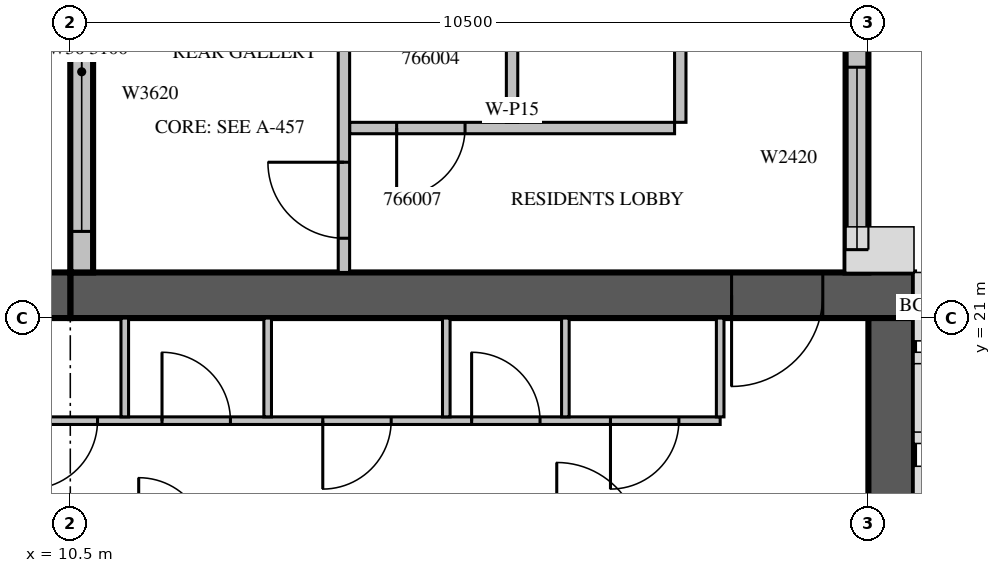
"""IFC4 building model, lengths in metres.
Left out: names, types, materials, properties, quantities, classifications, styles, units other than length and angle.
Written with IfcOpenShell. Run it as: python <this file> out.ifc"""

import sys

from ifc_helpers import new_model, si_unit, direction, frame, frame_2d, origin, place, context, subcontext, project, spatial, rectangle, extrude, source, transform, mapped, element, fill, save


model = new_model("IFC4")
c1 = context("Model", 3, precision=1e-05, world=origin(), true_north=direction((0.0, 1.0)))
c2 = subcontext(c1, "Body", "Model", "MODEL_VIEW")
j1 = project(units=[si_unit("LENGTHUNIT", "METRE"), si_unit("PLANEANGLEUNIT", "RADIAN")], contexts=[c1])
p1 = place(None, origin())
s1 = spatial("IfcSite", under=j1, at=p1, CompositionType="ELEMENT")
p2 = place(p1, origin())
s2 = spatial("IfcBuilding", under=s1, at=p2, CompositionType="ELEMENT")
p3 = place(p2, frame((0.0, 0.0, 291.5)))
s3 = spatial("IfcBuildingStorey", under=s2, at=p3, CompositionType="ELEMENT", Elevation=291.5)
m1 = source(origin(), c2, "Body", "SweptSolid", [
    extrude(rectangle(XDim=11.1, YDim=0.6, at=frame_2d((5.55, 0.0))), origin(), (0.0, 0.0, 1.0), 3.5),
])
p4 = place(p3, frame((10.5, 21.3, 0.0), z_axis=(0.0, 0.0, 1.0), x_axis=(1.0, 0.0, 0.0)))
e1 = element("IfcWall", 1, at=p4, inside=s3, PredefinedType="SHEAR", context=c2, shape_type="MappedRepresentation", body=[
    mapped(m1, transform((0.0, 0.0, 0.0), scale=1.0)),
])
m2 = source(origin(), c2, "Body", "SweptSolid", [
    extrude(rectangle(XDim=1.2, YDim=2.1, at=frame_2d((0.6, 1.05))), frame((0.0, 0.31, 0.0), z_axis=(0.0, -1.0, 0.0), x_axis=(1.0, 0.0, 0.0)), (0.0, 0.0, 1.0), 0.62),
])
p5 = place(p4, frame((8.7, 0.0, 0.0)))
e2 = element("IfcOpeningElement", 2, at=p5, cuts=e1, PredefinedType="OPENING", context=c2, shape_type="MappedRepresentation", body=[
    mapped(m2, transform((0.0, 0.0, 0.0), scale=1.0)),
])
m3 = source(origin(), c2, "Body", "SweptSolid", [
    extrude(rectangle(XDim=10.5, YDim=0.6, at=frame_2d((5.25, 0.0))), origin(), (0.0, 0.0, 1.0), 3.5),
])
p6 = place(p3, frame((21.3, 10.5, 0.0), z_axis=(0.0, 0.0, 1.0), x_axis=(0.0, 1.0, 0.0)))
e3 = element("IfcWall", 3, at=p6, inside=s3, PredefinedType="SHEAR", context=c2, shape_type="MappedRepresentation", body=[
    mapped(m3, transform((0.0, 0.0, 0.0), scale=1.0)),
])
m4 = source(origin(), c2, "Body", "SweptSolid", [
    extrude(rectangle(XDim=1.2, YDim=2.4, at=frame_2d((0.6, 1.2))), frame((0.0, 0.31, 0.0), z_axis=(0.0, -1.0, 0.0), x_axis=(1.0, 0.0, 0.0)), (0.0, 0.0, 1.0), 0.62),
])
p7 = place(p6, frame((5.7, 0.0, 0.6)))
e4 = element("IfcOpeningElement", 4, at=p7, cuts=e3, PredefinedType="OPENING", context=c2, shape_type="MappedRepresentation", body=[
    mapped(m4, transform((0.0, 0.0, 0.0), scale=1.0)),
])
m5 = source(origin(), c2, "Body", "SweptSolid", [
    extrude(rectangle(XDim=6.6, YDim=0.6, at=frame_2d((3.3, 0.0))), origin(), (0.0, 0.0, 1.0), 3.5),
])
p8 = place(p3, frame((3.9, 21.3, 0.0), z_axis=(0.0, 0.0, 1.0), x_axis=(1.0, 0.0, 0.0)))
e5 = element("IfcWall", 5, at=p8, inside=s3, PredefinedType="SHEAR", context=c2, shape_type="MappedRepresentation", body=[
    mapped(m5, transform((0.0, 0.0, 0.0), scale=1.0)),
])
p9 = place(p8, frame((1.5, 0.0, 0.6)))
e6 = element("IfcOpeningElement", 6, at=p9, cuts=e5, PredefinedType="OPENING", context=c2, shape_type="MappedRepresentation", body=[
    mapped(m4, transform((0.0, 0.0, 0.0), scale=1.0)),
])
p10 = place(p8, frame((3.6, 0.0, 0.6)))
e7 = element("IfcOpeningElement", 7, at=p10, cuts=e5, PredefinedType="OPENING", context=c2, shape_type="MappedRepresentation", body=[
    mapped(m4, transform((0.0, 0.0, 0.0), scale=1.0)),
])
m6 = source(origin(), c2, "Body", "SweptSolid", [
    extrude(rectangle(XDim=7.45, YDim=0.3, at=frame_2d((3.725, 0.0))), origin(), (0.0, 0.0, 1.0), 3.1),
])
p11 = place(p3, frame((20.85, 21.6, 0.0), z_axis=(0.0, 0.0, 1.0), x_axis=(0.0, 1.0, 0.0)))
e8 = element("IfcWall", 8, at=p11, inside=s3, PredefinedType="STANDARD", context=c2, shape_type="MappedRepresentation", body=[
    mapped(m6, transform((0.0, 0.0, 0.0), scale=1.0)),
])
m7 = source(origin(), c2, "Body", "SweptSolid", [
    extrude(rectangle(XDim=2.4, YDim=2.0, at=frame_2d((1.2, 1.0))), frame((0.0, 0.16, 0.0), z_axis=(0.0, -1.0, 0.0), x_axis=(1.0, 0.0, 0.0)), (0.0, 0.0, 1.0), 0.32),
])
p12 = place(p11, frame((0.3, 0.0, 0.6)))
e9 = element("IfcOpeningElement", 9, at=p12, cuts=e8, PredefinedType="OPENING", context=c2, shape_type="MappedRepresentation", body=[
    mapped(m7, transform((0.0, 0.0, 0.0), scale=1.0)),
])
m8 = source(origin(), c2, "Body", "SweptSolid", [
    extrude(rectangle(XDim=3.0, YDim=2.0, at=frame_2d((1.5, 1.0))), frame((0.0, 0.16, 0.0), z_axis=(0.0, -1.0, 0.0), x_axis=(1.0, 0.0, 0.0)), (0.0, 0.0, 1.0), 0.32),
])
p13 = place(p11, frame((4.2, 0.0, 0.6)))
e10 = element("IfcOpeningElement", 10, at=p13, cuts=e8, PredefinedType="OPENING", context=c2, shape_type="MappedRepresentation", body=[
    mapped(m8, transform((0.0, 0.0, 0.0), scale=1.0)),
])
m9 = source(origin(), c2, "Body", "SweptSolid", [
    extrude(rectangle(XDim=5.28, YDim=0.3, at=frame_2d((2.64, 0.0))), origin(), (0.0, 0.0, 1.0), 3.1),
])
p14 = place(p3, frame((10.65, 26.88, 0.0), z_axis=(0.0, 0.0, 1.0), x_axis=(0.0, -1.0, 0.0)))
e11 = element("IfcWall", 11, at=p14, inside=s3, PredefinedType="STANDARD", context=c2, shape_type="MappedRepresentation", body=[
    mapped(m9, transform((0.0, 0.0, 0.0), scale=1.0)),
])
m10 = source(origin(), c2, "Body", "SweptSolid", [
    extrude(rectangle(XDim=3.6, YDim=2.0, at=frame_2d((1.8, 1.0))), frame((0.0, 0.16, 0.0), z_axis=(0.0, -1.0, 0.0), x_axis=(1.0, 0.0, 0.0)), (0.0, 0.0, 1.0), 0.32),
])
p15 = place(p14, frame((1.14, 0.0, 0.6)))
e12 = element("IfcOpeningElement", 12, at=p15, cuts=e11, PredefinedType="OPENING", context=c2, shape_type="MappedRepresentation", body=[
    mapped(m10, transform((0.0, 0.0, 0.0), scale=1.0)),
])
p16 = place(p3, frame((9.65, 19.65, 0.0), z_axis=(0.0, 0.0, 1.0), x_axis=(1.0, 0.0, 0.0)))
e13 = element("IfcWall", 13, at=p16, inside=s3, PredefinedType="PARTITIONING", context=c2, shape_type="SweptSolid", body=[
    extrude(rectangle(XDim=9.4, YDim=0.1, at=frame_2d((4.7, 0.0))), origin(), (0.0, 0.0, 1.0), 3.1),
])
p17 = place(p16, frame((0.308, 0.0, 0.0)))
e14 = element("IfcOpeningElement", 14, at=p17, cuts=e13, PredefinedType="OPENING", context=c2, shape_type="SweptSolid", body=[
    extrude(rectangle(XDim=0.9, YDim=2.1, at=frame_2d((0.45, 1.05))), frame((0.0, 0.06, 0.0), z_axis=(0.0, -1.0, 0.0), x_axis=(1.0, 0.0, 0.0)), (0.0, 0.0, 1.0), 0.12),
])
m11 = source(origin(), c2, "Body", "SweptSolid", [
    extrude(rectangle(XDim=0.9, YDim=2.1, at=frame_2d((0.45, 1.05))), frame((0.0, 0.06, 0.0), z_axis=(0.0, -1.0, 0.0), x_axis=(1.0, 0.0, 0.0)), (0.0, 0.0, 1.0), 0.12),
])
p18 = place(p16, frame((2.057, 0.0, 0.0)))
e15 = element("IfcOpeningElement", 15, at=p18, cuts=e13, PredefinedType="OPENING", context=c2, shape_type="MappedRepresentation", body=[
    mapped(m11, transform((0.0, 0.0, 0.0), scale=1.0)),
])
p19 = place(p16, frame((4.172, 0.0, 0.0)))
e16 = element("IfcOpeningElement", 16, at=p19, cuts=e13, PredefinedType="OPENING", context=c2, shape_type="MappedRepresentation", body=[
    mapped(m11, transform((0.0, 0.0, 0.0), scale=1.0)),
])
p20 = place(p16, frame((6.13, 0.0, 0.0)))
e17 = element("IfcOpeningElement", 17, at=p20, cuts=e13, PredefinedType="OPENING", context=c2, shape_type="MappedRepresentation", body=[
    mapped(m11, transform((0.0, 0.0, 0.0), scale=1.0)),
])
p21 = place(p16, frame((7.957, 0.0, 0.0)))
e18 = element("IfcOpeningElement", 18, at=p21, cuts=e13, PredefinedType="OPENING", context=c2, shape_type="MappedRepresentation", body=[
    mapped(m11, transform((0.0, 0.0, 0.0), scale=1.0)),
])
p22 = place(p3, frame((11.217, 19.7, 0.0), z_axis=(0.0, 0.0, 1.0), x_axis=(0.0, 1.0, 0.0)))
e19 = element("IfcWall", 19, at=p22, inside=s3, PredefinedType="PARTITIONING", context=c2, shape_type="SweptSolid", body=[
    extrude(rectangle(XDim=1.3, YDim=0.1, at=frame_2d((0.65, 0.0))), origin(), (0.0, 0.0, 1.0), 3.1),
])
m12 = source(origin(), c2, "Body", "SweptSolid", [
    extrude(rectangle(XDim=1.3, YDim=0.1, at=frame_2d((0.65, 0.0))), origin(), (0.0, 0.0, 1.0), 3.1),
])
for number, where, z_axis, x_axis in (
    (20, (13.097, 19.7, 0.0), (0.0, 0.0, 1.0), (0.0, 1.0, 0.0)),
    (21, (15.447, 19.7, 0.0), (0.0, 0.0, 1.0), (0.0, 1.0, 0.0)),
    (22, (17.013, 19.7, 0.0), (0.0, 0.0, 1.0), (0.0, 1.0, 0.0)),
    (23, (19.05, 19.7, 0.0), (0.0, 0.0, 1.0), (0.0, 1.0, 0.0)),
):
    element("IfcWall", number, at=place(p3, frame(where, z_axis=z_axis, x_axis=x_axis)), inside=s3, PredefinedType="PARTITIONING", context=c2, shape_type="MappedRepresentation", body=[
        mapped(m12, transform((0.0, 0.0, 0.0), scale=1.0)),
    ])
p23 = place(p3, frame((14.175, 23.5, 0.0), z_axis=(0.0, 0.0, 1.0), x_axis=(1.0, 0.0, 0.0)))
e24 = element("IfcWall", 24, at=p23, inside=s3, PredefinedType="PARTITIONING", context=c2, shape_type="SweptSolid", body=[
    extrude(rectangle(XDim=4.275, YDim=0.15, at=frame_2d((2.138, 0.0))), origin(), (0.0, 0.0, 1.0), 3.1),
])
m13 = source(origin(), c2, "Body", "SweptSolid", [
    extrude(rectangle(XDim=0.9, YDim=2.1, at=frame_2d((0.45, 1.05))), frame((0.0, 0.085, 0.0), z_axis=(0.0, -1.0, 0.0), x_axis=(1.0, 0.0, 0.0)), (0.0, 0.0, 1.0), 0.17),
])
p24 = place(p23, frame((0.619, 0.0, 0.0)))
e25 = element("IfcOpeningElement", 25, at=p24, cuts=e24, PredefinedType="OPENING", context=c2, shape_type="MappedRepresentation", body=[
    mapped(m13, transform((0.0, 0.0, 0.0), scale=1.0)),
])
m14 = source(origin(), c2, "Body", "SweptSolid", [
    extrude(rectangle(XDim=5.75, YDim=0.15, at=frame_2d((2.875, 0.0))), origin(), (0.0, 0.0, 1.0), 3.1),
])
p25 = place(p3, frame((18.525, 23.575, 0.0), z_axis=(0.0, 0.0, 1.0), x_axis=(0.0, 1.0, 0.0)))
e26 = element("IfcWall", 26, at=p25, inside=s3, PredefinedType="PARTITIONING", context=c2, shape_type="MappedRepresentation", body=[
    mapped(m14, transform((0.0, 0.0, 0.0), scale=1.0)),
])
m15 = source(origin(), c2, "Body", "SweptSolid", [
    extrude(rectangle(XDim=1.0, YDim=2.1, at=frame_2d((0.5, 1.05))), frame((0.0, 0.085, 0.0), z_axis=(0.0, -1.0, 0.0), x_axis=(1.0, 0.0, 0.0)), (0.0, 0.0, 1.0), 0.17),
])
p26 = place(p25, frame((2.375, 0.0, 0.0)))
e27 = element("IfcOpeningElement", 27, at=p26, cuts=e26, PredefinedType="OPENING", context=c2, shape_type="MappedRepresentation", body=[
    mapped(m15, transform((0.0, 0.0, 0.0), scale=1.0)),
])
p27 = place(p3, frame((16.312, 23.575, 0.0), z_axis=(0.0, 0.0, 1.0), x_axis=(0.0, 1.0, 0.0)))
e28 = element("IfcWall", 28, at=p27, inside=s3, PredefinedType="PARTITIONING", context=c2, shape_type="MappedRepresentation", body=[
    mapped(m14, transform((0.0, 0.0, 0.0), scale=1.0)),
])
m16 = source(origin(), c2, "Body", "SweptSolid", [
    extrude(rectangle(XDim=7.725, YDim=0.15, at=frame_2d((3.862, 0.0))), origin(), (0.0, 0.0, 1.0), 3.1),
])
p28 = place(p3, frame((14.1, 29.325, 0.0), z_axis=(0.0, 0.0, 1.0), x_axis=(0.0, -1.0, 0.0)))
e29 = element("IfcWall", 29, at=p28, inside=s3, PredefinedType="PARTITIONING", context=c2, shape_type="MappedRepresentation", body=[
    mapped(m16, transform((0.0, 0.0, 0.0), scale=1.0)),
])
p29 = place(p28, frame((6.275, 0.0, 0.0)))
e30 = element("IfcOpeningElement", 30, at=p29, cuts=e29, PredefinedType="OPENING", context=c2, shape_type="MappedRepresentation", body=[
    mapped(m15, transform((0.0, 0.0, 0.0), scale=1.0)),
])
m17 = source(origin(), c2, "Body", "SweptSolid", [
    extrude(rectangle(XDim=2.4, YDim=2.0, at=frame_2d((1.2, 1.0))), frame((0.0, 0.03, 0.0), z_axis=(0.0, -1.0, 0.0), x_axis=(1.0, 0.0, 0.0)), (0.0, 0.0, 1.0), 0.06),
])
p30 = place(p12, origin())
e31 = element("IfcWindow", 31, at=p30, inside=s3, PartitioningType="SINGLE_PANEL", PredefinedType="WINDOW", context=c2, shape_type="MappedRepresentation", body=[
    mapped(m17, transform((0.0, 0.0, 0.0), scale=1.0)),
])
fill(e9, e31)
m18 = source(origin(), c2, "Body", "SweptSolid", [
    extrude(rectangle(XDim=3.6, YDim=2.0, at=frame_2d((1.8, 1.0))), frame((0.0, 0.03, 0.0), z_axis=(0.0, -1.0, 0.0), x_axis=(1.0, 0.0, 0.0)), (0.0, 0.0, 1.0), 0.06),
])
p31 = place(p15, origin())
e32 = element("IfcWindow", 32, at=p31, inside=s3, PartitioningType="SINGLE_PANEL", PredefinedType="WINDOW", context=c2, shape_type="MappedRepresentation", body=[
    mapped(m18, transform((0.0, 0.0, 0.0), scale=1.0)),
])
fill(e12, e32)
m19 = source(origin(), c2, "Body", "SweptSolid", [
    extrude(rectangle(XDim=0.9, YDim=2.1, at=frame_2d((0.45, 1.05))), frame((0.0, 0.025, 0.0), z_axis=(0.0, -1.0, 0.0), x_axis=(1.0, 0.0, 0.0)), (0.0, 0.0, 1.0), 0.05),
])
p32 = place(p17, origin())
e33 = element("IfcDoor", 33, at=p32, inside=s3, OperationType="SINGLE_SWING_RIGHT", PredefinedType="DOOR", context=c2, shape_type="MappedRepresentation", body=[
    mapped(m19, transform((0.0, 0.0, 0.0), scale=1.0)),
])
fill(e14, e33)
p33 = place(p18, origin())
e34 = element("IfcDoor", 34, at=p33, inside=s3, OperationType="SINGLE_SWING_LEFT", PredefinedType="DOOR", context=c2, shape_type="MappedRepresentation", body=[
    mapped(m19, transform((0.0, 0.0, 0.0), scale=1.0)),
])
fill(e15, e34)
p34 = place(p19, origin())
e35 = element("IfcDoor", 35, at=p34, inside=s3, OperationType="SINGLE_SWING_RIGHT", PredefinedType="DOOR", context=c2, shape_type="MappedRepresentation", body=[
    mapped(m19, transform((0.0, 0.0, 0.0), scale=1.0)),
])
fill(e16, e35)
p35 = place(p20, origin())
e36 = element("IfcDoor", 36, at=p35, inside=s3, OperationType="SINGLE_SWING_LEFT", PredefinedType="DOOR", context=c2, shape_type="MappedRepresentation", body=[
    mapped(m19, transform((0.0, 0.0, 0.0), scale=1.0)),
])
fill(e17, e36)
p36 = place(p21, origin())
e37 = element("IfcDoor", 37, at=p36, inside=s3, OperationType="SINGLE_SWING_RIGHT", PredefinedType="DOOR", context=c2, shape_type="MappedRepresentation", body=[
    mapped(m19, transform((0.0, 0.0, 0.0), scale=1.0)),
])
fill(e18, e37)
m20 = source(origin(), c2, "Body", "SweptSolid", [
    extrude(rectangle(XDim=1.2, YDim=2.1, at=frame_2d((0.6, 1.05))), frame((0.0, 0.025, 0.0), z_axis=(0.0, -1.0, 0.0), x_axis=(1.0, 0.0, 0.0)), (0.0, 0.0, 1.0), 0.05),
])
p37 = place(p5, origin())
e38 = element("IfcDoor", 38, at=p37, inside=s3, OperationType="SINGLE_SWING_RIGHT", PredefinedType="DOOR", context=c2, shape_type="MappedRepresentation", body=[
    mapped(m20, transform((0.0, 0.0, 0.0), scale=1.0)),
])
fill(e2, e38)
p38 = place(p24, origin())
e39 = element("IfcDoor", 39, at=p38, inside=s3, OperationType="SINGLE_SWING_RIGHT", PredefinedType="DOOR", context=c2, shape_type="MappedRepresentation", body=[
    mapped(m19, transform((0.0, 0.0, 0.0), scale=1.0)),
])
fill(e25, e39)
m21 = source(origin(), c2, "Body", "SweptSolid", [
    extrude(rectangle(XDim=1.0, YDim=2.1, at=frame_2d((0.5, 1.05))), frame((0.0, 0.025, 0.0), z_axis=(0.0, -1.0, 0.0), x_axis=(1.0, 0.0, 0.0)), (0.0, 0.0, 1.0), 0.05),
])
p39 = place(p29, origin())
e40 = element("IfcDoor", 40, at=p39, inside=s3, OperationType="SINGLE_SWING_RIGHT", PredefinedType="DOOR", context=c2, shape_type="MappedRepresentation", body=[
    mapped(m21, transform((0.0, 0.0, 0.0), scale=1.0)),
])
fill(e30, e40)
save(model, sys.argv[1])
